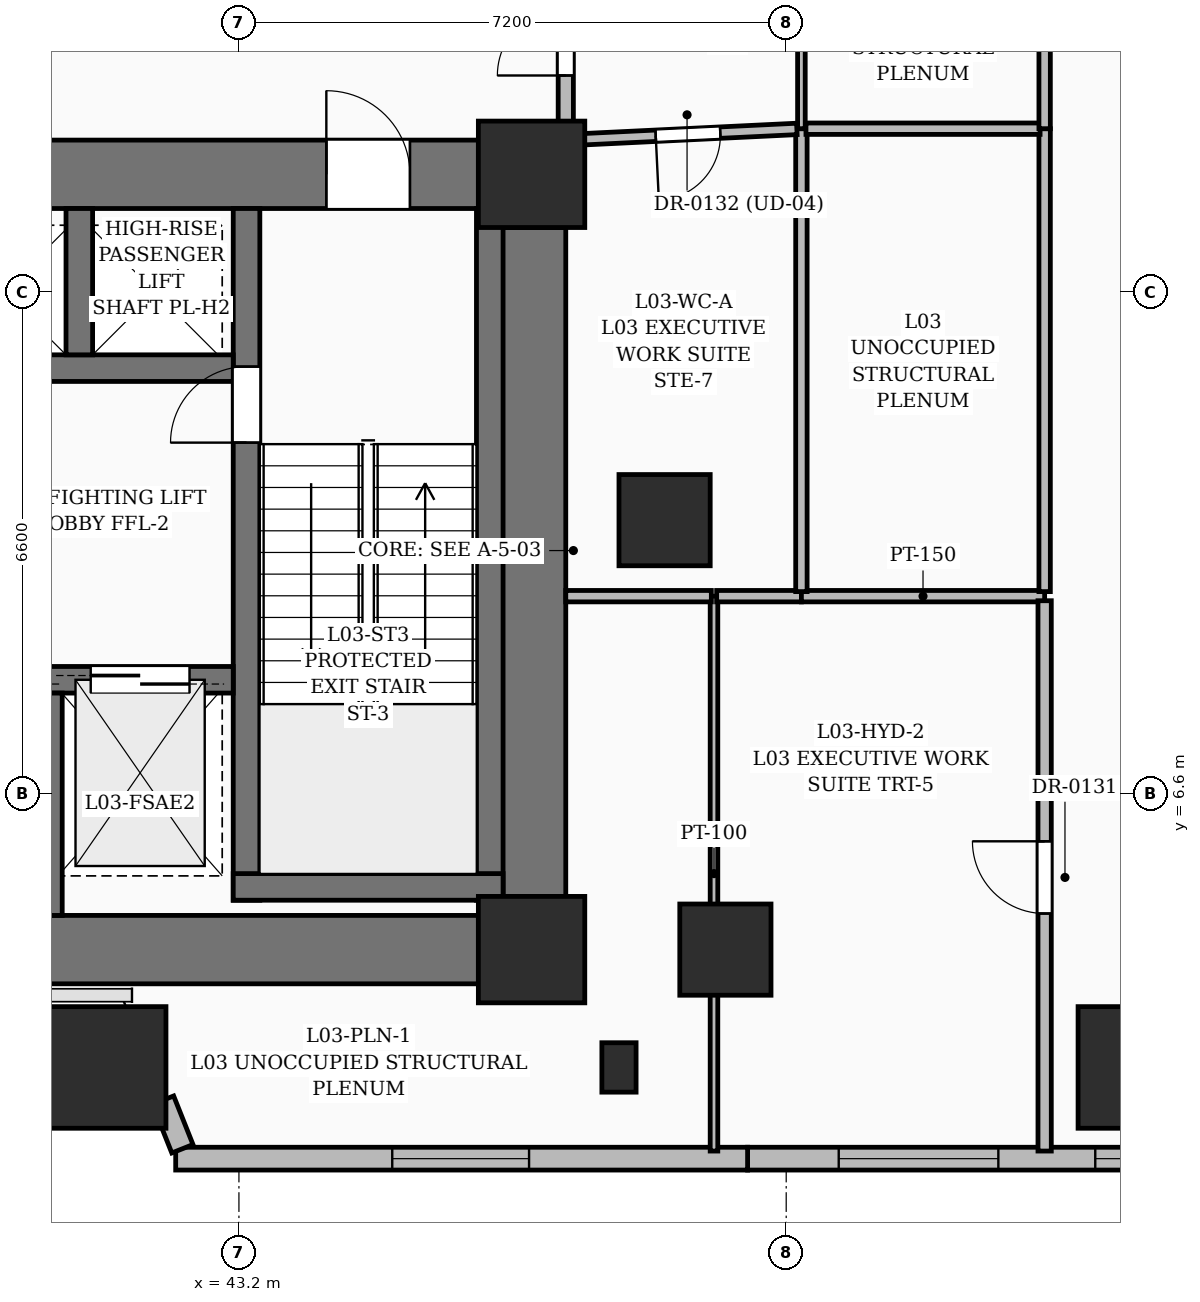
"""IFC4 building model, lengths in metres.
Left out: names, types, materials, properties, quantities, classifications, styles, units other than length and angle.
Written with IfcOpenShell. Run it as: python <this file> out.ifc"""

import sys

from ifc_helpers import new_model, si_unit, direction, frame, frame_2d, origin, origin_2d, place, context, subcontext, project, spatial, rectangle, extrude, element, fill, save


model = new_model("IFC4")
c1 = context("Model", 3, precision=1e-05, world=origin(), true_north=direction((0.0, 1.0)))
c2 = subcontext(c1, "Body", "Model", "MODEL_VIEW")
j1 = project(units=[si_unit("LENGTHUNIT", "METRE"), si_unit("PLANEANGLEUNIT", "RADIAN")], contexts=[c1])
p1 = place(None, origin())
s1 = spatial("IfcSite", under=j1, at=p1, CompositionType="ELEMENT")
p2 = place(p1, origin())
s2 = spatial("IfcBuilding", under=s1, at=p2, CompositionType="ELEMENT")
p3 = place(p2, frame((0.0, 0.0, 17.4)))
s3 = spatial("IfcBuildingStorey", under=s2, at=p3, CompositionType="ELEMENT", Elevation=17.4)
for number, where, z_axis, x_axis in (
    (1, (47.05, 4.55, 0.0), (0.0, 0.0, 1.0), (1.0, 0.0, 0.0)),
    (2, (47.05, 14.75, 0.0), (0.0, 0.0, 1.0), (1.0, 0.0, 0.0)),
):
    element("IfcColumn", number, at=place(p3, frame(where, z_axis=z_axis, x_axis=x_axis)), inside=s3, PredefinedType="COLUMN", context=c2, shape_type="SweptSolid", body=[
        extrude(rectangle(XDim=1.4, YDim=1.4, at=origin_2d()), origin(), (0.0, 0.0, 1.0), 4.5),
    ])
for number, where, z_axis, x_axis in (
    (3, (49.6, 4.55, 0.0), (0.0, 0.0, 1.0), (1.0, 0.0, 0.0)),
    (4, (48.8, 10.2, 0.0), (0.0, 0.0, 1.0), (1.0, 0.0, 0.0)),
):
    element("IfcColumn", number, at=place(p3, frame(where, z_axis=z_axis, x_axis=x_axis)), inside=s3, PredefinedType="COLUMN", context=c2, shape_type="SweptSolid", body=[
        extrude(rectangle(XDim=1.2, YDim=1.2, at=origin_2d()), origin(), (0.0, 0.0, 1.0), 4.5),
    ])
p4 = place(p3, frame((35.85, 4.55, 0.0), z_axis=(0.0, 0.0, 1.0), x_axis=(1.0, 0.0, 0.0)))
e5 = element("IfcWall", 5, at=p4, inside=s3, PredefinedType="SHEAR", context=c2, shape_type="SweptSolid", body=[
    extrude(rectangle(XDim=10.5, YDim=0.9, at=frame_2d((5.25, 0.0))), origin(), (0.0, 0.0, 1.0), 4.5),
])
p5 = place(p3, frame((35.85, 14.75, 0.0), z_axis=(0.0, 0.0, 1.0), x_axis=(1.0, 0.0, 0.0)))
e6 = element("IfcWall", 6, at=p5, inside=s3, PredefinedType="SHEAR", context=c2, shape_type="SweptSolid", body=[
    extrude(rectangle(XDim=10.5, YDim=0.9, at=frame_2d((5.25, 0.0))), origin(), (0.0, 0.0, 1.0), 4.5),
])
p6 = place(p5, frame((0.9, 0.0, 0.0)))
e7 = element("IfcOpeningElement", 7, at=p6, cuts=e6, PredefinedType="OPENING", context=c2, shape_type="SweptSolid", body=[
    extrude(rectangle(XDim=1.1, YDim=2.2, at=frame_2d((0.55, 1.1))), frame((0.0, 0.46, 0.0), z_axis=(0.0, -1.0, 0.0), x_axis=(1.0, 0.0, 0.0)), (0.0, 0.0, 1.0), 0.92),
])
p7 = place(p5, frame((8.5, 0.0, 0.0)))
e8 = element("IfcOpeningElement", 8, at=p7, cuts=e6, PredefinedType="OPENING", context=c2, shape_type="SweptSolid", body=[
    extrude(rectangle(XDim=1.1, YDim=2.2, at=frame_2d((0.55, 1.1))), frame((0.0, 0.46, 0.0), z_axis=(0.0, -1.0, 0.0), x_axis=(1.0, 0.0, 0.0)), (0.0, 0.0, 1.0), 0.92),
])
p8 = place(p3, frame((47.05, 5.25, 0.0), z_axis=(0.0, 0.0, 1.0), x_axis=(0.0, 1.0, 0.0)))
e9 = element("IfcWall", 9, at=p8, inside=s3, PredefinedType="SHEAR", context=c2, shape_type="SweptSolid", body=[
    extrude(rectangle(XDim=8.8, YDim=0.9, at=frame_2d((4.4, 0.0))), origin(), (0.0, 0.0, 1.0), 4.5),
])
p9 = place(p3, frame((43.3, 5.2, 0.0), z_axis=(0.0, 0.0, 1.0), x_axis=(0.0, 1.0, 0.0)))
e10 = element("IfcWall", 10, at=p9, inside=s3, PredefinedType="SOLIDWALL", context=c2, shape_type="SweptSolid", body=[
    extrude(rectangle(XDim=9.1, YDim=0.35, at=frame_2d((4.55, 0.0))), origin(), (0.0, 0.0, 1.0), 4.5),
])
p10 = place(p9, frame((6.02, 0.0, 0.0)))
e11 = element("IfcOpeningElement", 11, at=p10, cuts=e10, PredefinedType="OPENING", context=c2, shape_type="SweptSolid", body=[
    extrude(rectangle(XDim=1.0, YDim=2.15, at=frame_2d((0.5, 1.075))), frame((0.0, 0.185, 0.0), z_axis=(0.0, -1.0, 0.0), x_axis=(1.0, 0.0, 0.0)), (0.0, 0.0, 1.0), 0.37),
])
p11 = place(p3, frame((46.5, 5.2, 0.0), z_axis=(0.0, 0.0, 1.0), x_axis=(0.0, 1.0, 0.0)))
e12 = element("IfcWall", 12, at=p11, inside=s3, PredefinedType="SOLIDWALL", context=c2, shape_type="SweptSolid", body=[
    extrude(rectangle(XDim=9.1, YDim=0.35, at=frame_2d((4.55, 0.0))), origin(), (0.0, 0.0, 1.0), 4.5),
])
p12 = place(p3, frame((43.125, 5.375, 0.0), z_axis=(0.0, 0.0, 1.0), x_axis=(1.0, 0.0, 0.0)))
e13 = element("IfcWall", 13, at=p12, inside=s3, PredefinedType="SOLIDWALL", context=c2, shape_type="SweptSolid", body=[
    extrude(rectangle(XDim=3.55, YDim=0.35, at=frame_2d((1.775, 0.0))), origin(), (0.0, 0.0, 1.0), 4.5),
])
p13 = place(p3, frame((39.075, 8.1, 0.0), z_axis=(0.0, 0.0, 1.0), x_axis=(1.0, 0.0, 0.0)))
e14 = element("IfcWall", 14, at=p13, inside=s3, PredefinedType="SOLIDWALL", context=c2, shape_type="SweptSolid", body=[
    extrude(rectangle(XDim=4.05, YDim=0.35, at=frame_2d((2.025, 0.0))), origin(), (0.0, 0.0, 1.0), 4.5),
])
p14 = place(p13, frame((2.175, 0.0, 0.0)))
e15 = element("IfcOpeningElement", 15, at=p14, cuts=e14, PredefinedType="OPENING", context=c2, shape_type="SweptSolid", body=[
    extrude(rectangle(XDim=1.3, YDim=2.25, at=frame_2d((0.65, 1.125))), frame((0.0, 0.185, 0.0), z_axis=(0.0, -1.0, 0.0), x_axis=(1.0, 0.0, 0.0)), (0.0, 0.0, 1.0), 0.37),
])
p15 = place(p13, frame((0.275, 0.0, 0.0)))
e16 = element("IfcOpeningElement", 16, at=p15, cuts=e14, PredefinedType="OPENING", context=c2, shape_type="SweptSolid", body=[
    extrude(rectangle(XDim=1.1, YDim=2.2, at=frame_2d((0.55, 1.1))), frame((0.0, 0.185, 0.0), z_axis=(0.0, -1.0, 0.0), x_axis=(1.0, 0.0, 0.0)), (0.0, 0.0, 1.0), 0.37),
])
p16 = place(p3, frame((40.7, 5.0, 0.0), z_axis=(0.0, 0.0, 1.0), x_axis=(0.0, 1.0, 0.0)))
e17 = element("IfcWall", 17, at=p16, inside=s3, PredefinedType="SOLIDWALL", context=c2, shape_type="SweptSolid", body=[
    extrude(rectangle(XDim=2.925, YDim=0.35, at=frame_2d((1.462, 0.0))), origin(), (0.0, 0.0, 1.0), 4.5),
])
p17 = place(p3, frame((39.075, 12.2, 0.0), z_axis=(0.0, 0.0, 1.0), x_axis=(1.0, 0.0, 0.0)))
e18 = element("IfcWall", 18, at=p17, inside=s3, PredefinedType="SOLIDWALL", context=c2, shape_type="SweptSolid", body=[
    extrude(rectangle(XDim=4.05, YDim=0.35, at=frame_2d((2.025, 0.0))), origin(), (0.0, 0.0, 1.0), 4.5),
])
p18 = place(p3, frame((41.1, 12.375, 0.0), z_axis=(0.0, 0.0, 1.0), x_axis=(0.0, 1.0, 0.0)))
e19 = element("IfcWall", 19, at=p18, inside=s3, PredefinedType="SOLIDWALL", context=c2, shape_type="SweptSolid", body=[
    extrude(rectangle(XDim=1.925, YDim=0.35, at=frame_2d((0.962, 0.0))), origin(), (0.0, 0.0, 1.0), 4.5),
])
for number, where, z_axis, x_axis in (
    (20, (41.44, 3.0, 0.0), (0.0, 0.0, 1.0), (1.0, 0.0, 0.0)),
    (21, (55.04, 3.0, 0.0), (0.0, 0.0, 1.0), (1.0, 0.0, 0.0)),
):
    element("IfcColumn", number, at=place(p3, frame(where, z_axis=z_axis, x_axis=x_axis)), inside=s3, PredefinedType="COLUMN", context=c2, shape_type="SweptSolid", body=[
        extrude(rectangle(XDim=1.6, YDim=1.6, at=origin_2d()), origin(), (0.0, 0.0, 1.0), 4.5),
    ])
p19 = place(p3, frame((48.2, 3.0, 0.0), z_axis=(0.0, 0.0, 1.0), x_axis=(1.0, 0.0, 0.0)))
e22 = element("IfcColumn", 22, at=p19, inside=s3, PredefinedType="PILASTER", context=c2, shape_type="SweptSolid", body=[
    extrude(rectangle(XDim=0.45, YDim=0.65, at=origin_2d()), origin(), (0.0, 0.0, 1.0), 4.5),
])
p20 = place(p3, frame((57.416, 1.8, 0.0), z_axis=(0.0, 0.0, 1.0), x_axis=(-1.0, 0.0, 0.0)))
e23 = element("IfcWall", 23, at=p20, inside=s3, PredefinedType="SOLIDWALL", context=c2, shape_type="SweptSolid", body=[
    extrude(rectangle(XDim=7.524, YDim=0.3, at=frame_2d((3.762, 0.0))), origin(), (0.0, 0.0, 1.0), 4.2),
])
p21 = place(p20, frame((4.225, 0.0, 0.55)))
e24 = element("IfcOpeningElement", 24, at=p21, cuts=e23, PredefinedType="OPENING", context=c2, shape_type="SweptSolid", body=[
    extrude(rectangle(XDim=2.1, YDim=2.4, at=frame_2d((1.05, 1.2))), frame((0.0, 0.16, 0.0), z_axis=(0.0, -1.0, 0.0), x_axis=(1.0, 0.0, 0.0)), (0.0, 0.0, 1.0), 0.32),
])
p22 = place(p20, frame((0.85, 0.0, 0.55)))
e25 = element("IfcOpeningElement", 25, at=p22, cuts=e23, PredefinedType="OPENING", context=c2, shape_type="SweptSolid", body=[
    extrude(rectangle(XDim=2.1, YDim=2.4, at=frame_2d((1.05, 1.2))), frame((0.0, 0.16, 0.0), z_axis=(0.0, -1.0, 0.0), x_axis=(1.0, 0.0, 0.0)), (0.0, 0.0, 1.0), 0.32),
])
p23 = place(p3, frame((49.892, 1.8, 0.0), z_axis=(0.0, 0.0, 1.0), x_axis=(-1.0, 0.0, 0.0)))
e26 = element("IfcWall", 26, at=p23, inside=s3, PredefinedType="SOLIDWALL", context=c2, shape_type="SweptSolid", body=[
    extrude(rectangle(XDim=7.524, YDim=0.3, at=frame_2d((3.762, 0.0))), origin(), (0.0, 0.0, 1.0), 4.2),
])
p24 = place(p23, frame((2.875, 0.0, 0.6)))
e27 = element("IfcOpeningElement", 27, at=p24, cuts=e26, PredefinedType="OPENING", context=c2, shape_type="SweptSolid", body=[
    extrude(rectangle(XDim=1.8, YDim=2.1, at=frame_2d((0.9, 1.05))), frame((0.0, 0.16, 0.0), z_axis=(0.0, -1.0, 0.0), x_axis=(1.0, 0.0, 0.0)), (0.0, 0.0, 1.0), 0.32),
])
p25 = place(p3, frame((42.456, 1.93, 0.0), z_axis=(0.0, 0.0, 1.0), x_axis=(-0.369677329341, 0.929160197259, 0.0)))
e28 = element("IfcWall", 28, at=p25, inside=s3, PredefinedType="SOLIDWALL", context=c2, shape_type="SweptSolid", body=[
    extrude(rectangle(XDim=0.688, YDim=0.3, at=frame_2d((0.344, 0.0))), origin(), (0.0, 0.0, 1.0), 4.2),
])
p26 = place(p3, frame((47.5, 15.2, 0.0), z_axis=(0.0, 0.0, 1.0), x_axis=(0.0, 1.0, 0.0)))
e29 = element("IfcWall", 29, at=p26, inside=s3, PredefinedType="PARTITIONING", context=c2, shape_type="SweptSolid", body=[
    extrude(rectangle(XDim=2.515, YDim=0.2, at=frame_2d((1.258, 0.0))), origin(), (0.0, 0.0, 1.0), 3.078),
])
p27 = place(p26, frame((0.85, 0.0, 0.0)))
e30 = element("IfcOpeningElement", 30, at=p27, cuts=e29, PredefinedType="OPENING", context=c2, shape_type="SweptSolid", body=[
    extrude(rectangle(XDim=0.9, YDim=2.1, at=frame_2d((0.45, 1.05))), frame((0.0, 0.11, 0.0), z_axis=(0.0, -1.0, 0.0), x_axis=(1.0, 0.0, 0.0)), (0.0, 0.0, 1.0), 0.22),
])
p28 = place(p3, frame((49.45, 1.9, 0.0), z_axis=(0.0, 0.0, 1.0), x_axis=(0.0, 1.0, 0.0)))
e31 = element("IfcWall", 31, at=p28, inside=s3, PredefinedType="PARTITIONING", context=c2, shape_type="SweptSolid", body=[
    extrude(rectangle(XDim=7.3, YDim=0.1, at=frame_2d((3.65, 0.0))), origin(), (0.0, 0.0, 1.0), 2.97),
])
p29 = place(p3, frame((49.415, 9.2, 0.0), z_axis=(0.0, 0.0, 1.0), x_axis=(-1.0, 0.0, 0.0)))
e32 = element("IfcWall", 32, at=p29, inside=s3, PredefinedType="PARTITIONING", context=c2, shape_type="SweptSolid", body=[
    extrude(rectangle(XDim=1.915, YDim=0.15, at=frame_2d((0.958, 0.0))), origin(), (0.0, 0.0, 1.0), 3.159),
])
p30 = place(p3, frame((50.6, 9.2, 0.0), z_axis=(0.0, 0.0, 1.0), x_axis=(-1.0, 0.0, 0.0)))
e33 = element("IfcWall", 33, at=p30, inside=s3, PredefinedType="PARTITIONING", context=c2, shape_type="SweptSolid", body=[
    extrude(rectangle(XDim=1.115, YDim=0.15, at=frame_2d((0.558, 0.0))), origin(), (0.0, 0.0, 1.0), 4.2),
])
p31 = place(p3, frame((53.8, 9.2, 0.0), z_axis=(0.0, 0.0, 1.0), x_axis=(-1.0, 0.0, 0.0)))
e34 = element("IfcWall", 34, at=p31, inside=s3, PredefinedType="PARTITIONING", context=c2, shape_type="SweptSolid", body=[
    extrude(rectangle(XDim=3.2, YDim=0.15, at=frame_2d((1.6, 0.0))), origin(), (0.0, 0.0, 1.0), 3.71),
])
p32 = place(p3, frame((53.8, 1.9, 0.0), z_axis=(0.0, 0.0, 1.0), x_axis=(0.0, 1.0, 0.0)))
e35 = element("IfcWall", 35, at=p32, inside=s3, PredefinedType="PARTITIONING", context=c2, shape_type="SweptSolid", body=[
    extrude(rectangle(XDim=7.24, YDim=0.175, at=frame_2d((3.62, 0.0))), origin(), (0.0, 0.0, 1.0), 2.97),
])
p33 = place(p32, frame((3.125, 0.0, 0.0)))
e36 = element("IfcOpeningElement", 36, at=p33, cuts=e35, PredefinedType="OPENING", context=c2, shape_type="SweptSolid", body=[
    extrude(rectangle(XDim=0.95, YDim=2.2, at=frame_2d((0.475, 1.1))), frame((0.0, 0.097, 0.0), z_axis=(0.0, -1.0, 0.0), x_axis=(1.0, 0.0, 0.0)), (0.0, 0.0, 1.0), 0.195),
])
p34 = place(p3, frame((50.6, 9.26, 0.0), z_axis=(0.0, 0.0, 1.0), x_axis=(0.0, 1.0, 0.0)))
e37 = element("IfcWall", 37, at=p34, inside=s3, PredefinedType="PARTITIONING", context=c2, shape_type="SweptSolid", body=[
    extrude(rectangle(XDim=6.09, YDim=0.15, at=frame_2d((3.045, 0.0))), origin(), (0.0, 0.0, 1.0), 3.078),
])
p35 = place(p3, frame((50.54, 15.347, 0.0), z_axis=(0.0, 0.0, 1.0), x_axis=(-0.998830110694, -0.048357108796, 0.0)))
e38 = element("IfcWall", 38, at=p35, inside=s3, PredefinedType="PARTITIONING", context=c2, shape_type="SweptSolid", body=[
    extrude(rectangle(XDim=2.958, YDim=0.15, at=frame_2d((1.479, 0.0))), origin(), (0.0, 0.0, 1.0), 3.078),
])
p36 = place(p35, frame((1.009, 0.0, 0.0)))
e39 = element("IfcOpeningElement", 39, at=p36, cuts=e38, PredefinedType="OPENING", context=c2, shape_type="SweptSolid", body=[
    extrude(rectangle(XDim=0.85, YDim=2.1, at=frame_2d((0.425, 1.05))), frame((0.0, 0.085, 0.0), z_axis=(0.0, -1.0, 0.0), x_axis=(1.0, 0.0, 0.0)), (0.0, 0.0, 1.0), 0.17),
])
p37 = place(p3, frame((53.8, 9.26, 0.0), z_axis=(0.0, 0.0, 1.0), x_axis=(0.0, 1.0, 0.0)))
e40 = element("IfcWall", 40, at=p37, inside=s3, PredefinedType="PARTITIONING", context=c2, shape_type="SweptSolid", body=[
    extrude(rectangle(XDim=6.09, YDim=0.15, at=frame_2d((3.045, 0.0))), origin(), (0.0, 0.0, 1.0), 3.078),
])
p38 = place(p3, frame((53.74, 15.35, 0.0), z_axis=(0.0, 0.0, 1.0), x_axis=(-1.0, 0.0, 0.0)))
e41 = element("IfcWall", 41, at=p38, inside=s3, PredefinedType="PARTITIONING", context=c2, shape_type="SweptSolid", body=[
    extrude(rectangle(XDim=3.08, YDim=0.15, at=frame_2d((1.54, 0.0))), origin(), (0.0, 0.0, 1.0), 3.71),
])
p39 = place(p3, frame((53.8, 17.728, 0.0), z_axis=(0.0, 0.0, 1.0), x_axis=(0.0, -1.0, 0.0)))
e42 = element("IfcWall", 42, at=p39, inside=s3, PredefinedType="PARTITIONING", context=c2, shape_type="SweptSolid", body=[
    extrude(rectangle(XDim=2.377, YDim=0.15, at=frame_2d((1.189, 0.0))), origin(), (0.0, 0.0, 1.0), 3.71),
])
p40 = place(p3, frame((50.6, 15.35, 0.0), z_axis=(0.0, 0.0, 1.0), x_axis=(0.0, 1.0, 0.0)))
e43 = element("IfcWall", 43, at=p40, inside=s3, PredefinedType="PARTITIONING", context=c2, shape_type="SweptSolid", body=[
    extrude(rectangle(XDim=2.415, YDim=0.1, at=frame_2d((1.208, 0.0))), origin(), (0.0, 0.0, 1.0), 4.2),
])
p41 = place(p21, origin())
e44 = element("IfcWindow", 44, at=p41, inside=s3, PartitioningType="SINGLE_PANEL", PredefinedType="WINDOW", context=c2, shape_type="SweptSolid", body=[
    extrude(rectangle(XDim=2.1, YDim=2.4, at=frame_2d((1.05, 1.2))), frame((0.0, 0.03, 0.0), z_axis=(0.0, -1.0, 0.0), x_axis=(1.0, 0.0, 0.0)), (0.0, 0.0, 1.0), 0.06),
])
fill(e24, e44)
p42 = place(p22, origin())
e45 = element("IfcWindow", 45, at=p42, inside=s3, PartitioningType="SINGLE_PANEL", PredefinedType="WINDOW", context=c2, shape_type="SweptSolid", body=[
    extrude(rectangle(XDim=2.1, YDim=2.4, at=frame_2d((1.05, 1.2))), frame((0.0, 0.03, 0.0), z_axis=(0.0, -1.0, 0.0), x_axis=(1.0, 0.0, 0.0)), (0.0, 0.0, 1.0), 0.06),
])
fill(e25, e45)
p43 = place(p24, origin())
e46 = element("IfcWindow", 46, at=p43, inside=s3, PartitioningType="SINGLE_PANEL", PredefinedType="WINDOW", context=c2, shape_type="SweptSolid", body=[
    extrude(rectangle(XDim=1.8, YDim=2.1, at=frame_2d((0.9, 1.05))), frame((0.0, 0.03, 0.0), z_axis=(0.0, -1.0, 0.0), x_axis=(1.0, 0.0, 0.0)), (0.0, 0.0, 1.0), 0.06),
])
fill(e27, e46)
p44 = place(p7, origin())
e47 = element("IfcDoor", 47, at=p44, inside=s3, OperationType="SINGLE_SWING_LEFT", PredefinedType="DOOR", context=c2, shape_type="SweptSolid", body=[
    extrude(rectangle(XDim=1.1, YDim=2.2, at=frame_2d((0.55, 1.1))), frame((0.0, 0.025, 0.0), z_axis=(0.0, -1.0, 0.0), x_axis=(1.0, 0.0, 0.0)), (0.0, 0.0, 1.0), 0.05),
])
fill(e8, e47)
p45 = place(p10, origin())
e48 = element("IfcDoor", 48, at=p45, inside=s3, OperationType="SINGLE_SWING_LEFT", PredefinedType="DOOR", context=c2, shape_type="SweptSolid", body=[
    extrude(rectangle(XDim=1.0, YDim=2.15, at=frame_2d((0.5, 1.075))), frame((0.0, 0.025, 0.0), z_axis=(0.0, -1.0, 0.0), x_axis=(1.0, 0.0, 0.0)), (0.0, 0.0, 1.0), 0.05),
])
fill(e11, e48)
p46 = place(p14, origin())
e49 = element("IfcDoor", 49, at=p46, inside=s3, OperationType="DOUBLE_DOOR_SLIDING", PredefinedType="DOOR", context=c2, shape_type="SweptSolid", body=[
    extrude(rectangle(XDim=1.3, YDim=2.25, at=frame_2d((0.65, 1.125))), frame((0.0, 0.025, 0.0), z_axis=(0.0, -1.0, 0.0), x_axis=(1.0, 0.0, 0.0)), (0.0, 0.0, 1.0), 0.05),
])
fill(e15, e49)
p47 = place(p27, origin())
e50 = element("IfcDoor", 50, at=p47, inside=s3, OperationType="SINGLE_SWING_LEFT", PredefinedType="DOOR", context=c2, shape_type="SweptSolid", body=[
    extrude(rectangle(XDim=0.9, YDim=2.1, at=frame_2d((0.45, 1.05))), frame((0.0, 0.025, 0.0), z_axis=(0.0, -1.0, 0.0), x_axis=(1.0, 0.0, 0.0)), (0.0, 0.0, 1.0), 0.05),
])
fill(e30, e50)
p48 = place(p33, origin())
e51 = element("IfcDoor", 51, at=p48, inside=s3, OperationType="SINGLE_SWING_RIGHT", PredefinedType="DOOR", context=c2, shape_type="SweptSolid", body=[
    extrude(rectangle(XDim=0.95, YDim=2.2, at=frame_2d((0.475, 1.1))), frame((0.0, 0.025, 0.0), z_axis=(0.0, -1.0, 0.0), x_axis=(1.0, 0.0, 0.0)), (0.0, 0.0, 1.0), 0.05),
])
fill(e36, e51)
p49 = place(p36, origin())
e52 = element("IfcDoor", 52, at=p49, inside=s3, OperationType="SINGLE_SWING_RIGHT", PredefinedType="DOOR", context=c2, shape_type="SweptSolid", body=[
    extrude(rectangle(XDim=0.85, YDim=2.1, at=frame_2d((0.425, 1.05))), frame((0.0, 0.025, 0.0), z_axis=(0.0, -1.0, 0.0), x_axis=(1.0, 0.0, 0.0)), (0.0, 0.0, 1.0), 0.05),
])
fill(e39, e52)
save(model, sys.argv[1])
